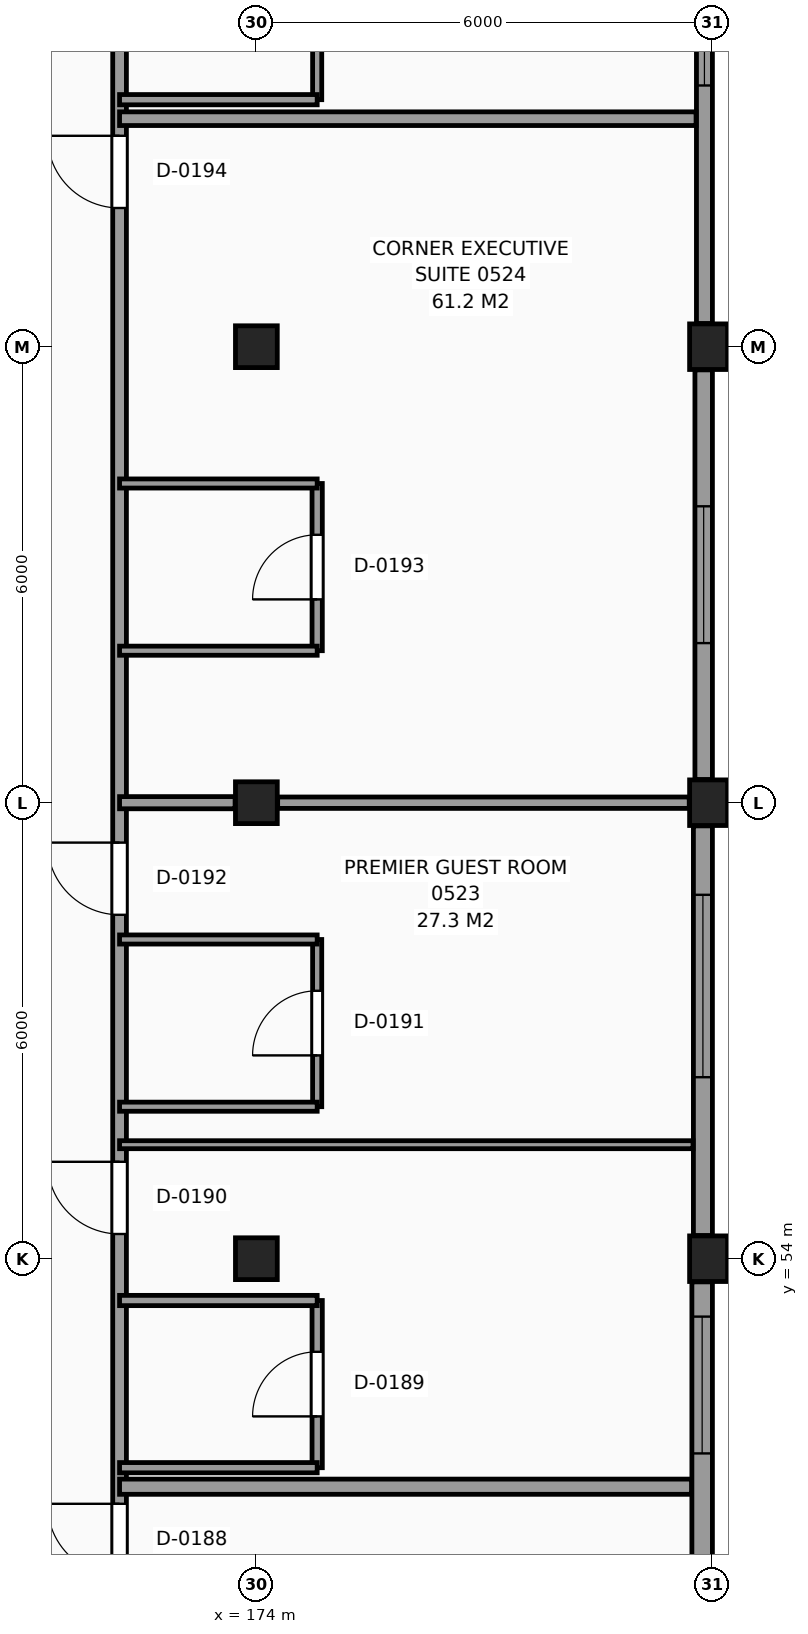
"""IFC4 building model, lengths in metres.
Left out: names, types, materials, properties, quantities, classifications, styles, units other than length and angle.
Written with IfcOpenShell. Run it as: python <this file> out.ifc"""

import sys

from ifc_helpers import new_model, si_unit, direction, frame, frame_2d, origin, origin_2d, place, context, subcontext, project, spatial, rectangle, extrude, element, fill, save


model = new_model("IFC4")
c1 = context("Model", 3, precision=1e-05, world=origin(), true_north=direction((0.0, 1.0)))
c2 = subcontext(c1, "Body", "Model", "MODEL_VIEW")
j1 = project(units=[si_unit("LENGTHUNIT", "METRE"), si_unit("PLANEANGLEUNIT", "RADIAN")], contexts=[c1])
p1 = place(None, origin())
s1 = spatial("IfcSite", under=j1, at=p1, CompositionType="ELEMENT")
p2 = place(p1, origin())
s2 = spatial("IfcBuilding", under=s1, at=p2, CompositionType="ELEMENT")
p3 = place(p2, frame((0.0, 0.0, 24.6)))
s3 = spatial("IfcBuildingStorey", under=s2, at=p3, CompositionType="ELEMENT", Elevation=24.6)
for number, where, z_axis, x_axis in (
    (1, (174.0, 54.0, 0.0), (0.0, 0.0, 1.0), (1.0, 0.0, 0.0)),
    (2, (174.0, 60.0, 0.0), (0.0, 0.0, 1.0), (1.0, 0.0, 0.0)),
    (3, (174.0, 66.0, 0.0), (0.0, 0.0, 1.0), (1.0, 0.0, 0.0)),
):
    element("IfcColumn", number, at=place(p3, frame(where, z_axis=z_axis, x_axis=x_axis)), inside=s3, PredefinedType="COLUMN", context=c2, shape_type="SweptSolid", body=[
        extrude(rectangle(XDim=0.55, YDim=0.55, at=origin_2d()), origin(), (0.0, 0.0, 1.0), 3.6),
    ])
for number, where, z_axis, x_axis in (
    (4, (180.0, 54.0, 0.0), (0.0, 0.0, 1.0), (1.0, 0.0, 0.0)),
    (5, (180.0, 60.0, 0.0), (0.0, 0.0, 1.0), (1.0, 0.0, 0.0)),
    (6, (180.0, 66.0, 0.0), (0.0, 0.0, 1.0), (1.0, 0.0, 0.0)),
):
    element("IfcColumn", number, at=place(p3, frame(where, z_axis=z_axis, x_axis=x_axis)), inside=s3, PredefinedType="COLUMN", context=c2, shape_type="SweptSolid", body=[
        extrude(rectangle(XDim=0.6, YDim=0.6, at=origin_2d()), origin(), (0.0, 0.0, 1.0), 3.6),
    ])
p4 = place(p3, frame((179.865, 48.305, 0.0), z_axis=(0.0, 0.0, 1.0), x_axis=(0.0, 1.0, 0.0)))
e7 = element("IfcWall", 7, at=p4, inside=s3, PredefinedType="SOLIDWALL", context=c2, shape_type="SweptSolid", body=[
    extrude(rectangle(XDim=5.39, YDim=0.27, at=frame_2d((2.695, 0.0))), origin(), (0.0, 0.0, 1.0), 2.73),
])
p5 = place(p4, frame((3.133, 0.0, 0.8)))
e8 = element("IfcOpeningElement", 8, at=p5, cuts=e7, PredefinedType="OPENING", context=c2, shape_type="SweptSolid", body=[
    extrude(rectangle(XDim=1.8, YDim=1.7, at=frame_2d((0.9, 0.85))), frame((0.0, 0.145, 0.0), z_axis=(0.0, -1.0, 0.0), x_axis=(1.0, 0.0, 0.0)), (0.0, 0.0, 1.0), 0.29),
])
p6 = place(p3, frame((179.875, 54.305, 0.0), z_axis=(0.0, 0.0, 1.0), x_axis=(0.0, 1.0, 0.0)))
e9 = element("IfcWall", 9, at=p6, inside=s3, PredefinedType="SOLIDWALL", context=c2, shape_type="SweptSolid", body=[
    extrude(rectangle(XDim=5.39, YDim=0.25, at=frame_2d((2.695, 0.0))), origin(), (0.0, 0.0, 1.0), 2.73),
])
p7 = place(p6, frame((2.083, 0.0, 0.8)))
e10 = element("IfcOpeningElement", 10, at=p7, cuts=e9, PredefinedType="OPENING", context=c2, shape_type="SweptSolid", body=[
    extrude(rectangle(XDim=2.4, YDim=1.75, at=frame_2d((1.2, 0.875))), frame((0.0, 0.135, 0.0), z_axis=(0.0, -1.0, 0.0), x_axis=(1.0, 0.0, 0.0)), (0.0, 0.0, 1.0), 0.27),
])
p8 = place(p3, frame((179.885, 60.305, 0.0), z_axis=(0.0, 0.0, 1.0), x_axis=(0.0, 1.0, 0.0)))
e11 = element("IfcWall", 11, at=p8, inside=s3, PredefinedType="SOLIDWALL", context=c2, shape_type="SweptSolid", body=[
    extrude(rectangle(XDim=5.39, YDim=0.23, at=frame_2d((2.695, 0.0))), origin(), (0.0, 0.0, 1.0), 2.73),
])
p9 = place(p8, frame((1.795, 0.0, 0.8)))
e12 = element("IfcOpeningElement", 12, at=p9, cuts=e11, PredefinedType="OPENING", context=c2, shape_type="SweptSolid", body=[
    extrude(rectangle(XDim=1.8, YDim=1.7, at=frame_2d((0.9, 0.85))), frame((0.0, 0.125, 0.0), z_axis=(0.0, -1.0, 0.0), x_axis=(1.0, 0.0, 0.0)), (0.0, 0.0, 1.0), 0.25),
])
p10 = place(p3, frame((179.895, 66.305, 0.0), z_axis=(0.0, 0.0, 1.0), x_axis=(0.0, 1.0, 0.0)))
e13 = element("IfcWall", 13, at=p10, inside=s3, PredefinedType="SOLIDWALL", context=c2, shape_type="SweptSolid", body=[
    extrude(rectangle(XDim=5.39, YDim=0.21, at=frame_2d((2.695, 0.0))), origin(), (0.0, 0.0, 1.0), 2.73),
])
p11 = place(p10, frame((3.132, 0.0, 0.8)))
e14 = element("IfcOpeningElement", 14, at=p11, cuts=e13, PredefinedType="OPENING", context=c2, shape_type="SweptSolid", body=[
    extrude(rectangle(XDim=1.8, YDim=1.7, at=frame_2d((0.9, 0.85))), frame((0.0, 0.115, 0.0), z_axis=(0.0, -1.0, 0.0), x_axis=(1.0, 0.0, 0.0)), (0.0, 0.0, 1.0), 0.23),
])
p12 = place(p3, frame((172.2, 42.215, 0.0), z_axis=(0.0, 0.0, 1.0), x_axis=(0.0, 1.0, 0.0)))
e15 = element("IfcWall", 15, at=p12, inside=s3, PredefinedType="PARTITIONING", context=c2, shape_type="SweptSolid", body=[
    extrude(rectangle(XDim=65.605, YDim=0.18, at=frame_2d((32.802, 0.0))), origin(), (0.0, 0.0, 1.0), 3.38),
])
p13 = place(p12, frame((7.61, 0.0, 0.0)))
e16 = element("IfcOpeningElement", 16, at=p13, cuts=e15, PredefinedType="OPENING", context=c2, shape_type="SweptSolid", body=[
    extrude(rectangle(XDim=0.95, YDim=2.1, at=frame_2d((0.475, 1.05))), frame((0.0, 0.1, 0.0), z_axis=(0.0, -1.0, 0.0), x_axis=(1.0, 0.0, 0.0)), (0.0, 0.0, 1.0), 0.2),
])
p14 = place(p12, frame((12.11, 0.0, 0.0)))
e17 = element("IfcOpeningElement", 17, at=p14, cuts=e15, PredefinedType="OPENING", context=c2, shape_type="SweptSolid", body=[
    extrude(rectangle(XDim=0.95, YDim=2.1, at=frame_2d((0.475, 1.05))), frame((0.0, 0.1, 0.0), z_axis=(0.0, -1.0, 0.0), x_axis=(1.0, 0.0, 0.0)), (0.0, 0.0, 1.0), 0.2),
])
p15 = place(p12, frame((16.31, 0.0, 0.0)))
e18 = element("IfcOpeningElement", 18, at=p15, cuts=e15, PredefinedType="OPENING", context=c2, shape_type="SweptSolid", body=[
    extrude(rectangle(XDim=0.95, YDim=2.1, at=frame_2d((0.475, 1.05))), frame((0.0, 0.1, 0.0), z_axis=(0.0, -1.0, 0.0), x_axis=(1.0, 0.0, 0.0)), (0.0, 0.0, 1.0), 0.2),
])
p16 = place(p12, frame((25.61, 0.0, 0.0)))
e19 = element("IfcOpeningElement", 19, at=p16, cuts=e15, PredefinedType="OPENING", context=c2, shape_type="SweptSolid", body=[
    extrude(rectangle(XDim=0.95, YDim=2.1, at=frame_2d((0.475, 1.05))), frame((0.0, 0.1, 0.0), z_axis=(0.0, -1.0, 0.0), x_axis=(1.0, 0.0, 0.0)), (0.0, 0.0, 1.0), 0.2),
])
p17 = place(p12, frame((30.11, 0.0, 0.0)))
e20 = element("IfcOpeningElement", 20, at=p17, cuts=e15, PredefinedType="OPENING", context=c2, shape_type="SweptSolid", body=[
    extrude(rectangle(XDim=0.95, YDim=2.1, at=frame_2d((0.475, 1.05))), frame((0.0, 0.1, 0.0), z_axis=(0.0, -1.0, 0.0), x_axis=(1.0, 0.0, 0.0)), (0.0, 0.0, 1.0), 0.2),
])
p18 = place(p12, frame((34.31, 0.0, 0.0)))
e21 = element("IfcOpeningElement", 21, at=p18, cuts=e15, PredefinedType="OPENING", context=c2, shape_type="SweptSolid", body=[
    extrude(rectangle(XDim=0.95, YDim=2.1, at=frame_2d((0.475, 1.05))), frame((0.0, 0.1, 0.0), z_axis=(0.0, -1.0, 0.0), x_axis=(1.0, 0.0, 0.0)), (0.0, 0.0, 1.0), 0.2),
])
p19 = place(p12, frame((36.51, 0.0, 0.0)))
e22 = element("IfcOpeningElement", 22, at=p19, cuts=e15, PredefinedType="OPENING", context=c2, shape_type="SweptSolid", body=[
    extrude(rectangle(XDim=0.95, YDim=2.1, at=frame_2d((0.475, 1.05))), frame((0.0, 0.1, 0.0), z_axis=(0.0, -1.0, 0.0), x_axis=(1.0, 0.0, 0.0)), (0.0, 0.0, 1.0), 0.2),
])
p20 = place(p12, frame((42.51, 0.0, 0.0)))
e23 = element("IfcOpeningElement", 23, at=p20, cuts=e15, PredefinedType="OPENING", context=c2, shape_type="SweptSolid", body=[
    extrude(rectangle(XDim=0.95, YDim=2.1, at=frame_2d((0.475, 1.05))), frame((0.0, 0.1, 0.0), z_axis=(0.0, -1.0, 0.0), x_axis=(1.0, 0.0, 0.0)), (0.0, 0.0, 1.0), 0.2),
])
p21 = place(p12, frame((52.31, 0.0, 0.0)))
e24 = element("IfcOpeningElement", 24, at=p21, cuts=e15, PredefinedType="OPENING", context=c2, shape_type="SweptSolid", body=[
    extrude(rectangle(XDim=0.95, YDim=2.1, at=frame_2d((0.475, 1.05))), frame((0.0, 0.1, 0.0), z_axis=(0.0, -1.0, 0.0), x_axis=(1.0, 0.0, 0.0)), (0.0, 0.0, 1.0), 0.2),
])
p22 = place(p12, frame((54.51, 0.0, 0.0)))
e25 = element("IfcOpeningElement", 25, at=p22, cuts=e15, PredefinedType="OPENING", context=c2, shape_type="SweptSolid", body=[
    extrude(rectangle(XDim=0.95, YDim=2.1, at=frame_2d((0.475, 1.05))), frame((0.0, 0.1, 0.0), z_axis=(0.0, -1.0, 0.0), x_axis=(1.0, 0.0, 0.0)), (0.0, 0.0, 1.0), 0.2),
])
p23 = place(p12, frame((60.51, 0.0, 0.0)))
e26 = element("IfcOpeningElement", 26, at=p23, cuts=e15, PredefinedType="OPENING", context=c2, shape_type="SweptSolid", body=[
    extrude(rectangle(XDim=0.95, YDim=2.1, at=frame_2d((0.475, 1.05))), frame((0.0, 0.1, 0.0), z_axis=(0.0, -1.0, 0.0), x_axis=(1.0, 0.0, 0.0)), (0.0, 0.0, 1.0), 0.2),
])
p24 = place(p3, frame((174.8, 51.25, 0.0), z_axis=(0.0, 0.0, 1.0), x_axis=(0.0, 1.0, 0.0)))
e27 = element("IfcWall", 27, at=p24, inside=s3, PredefinedType="PARTITIONING", context=c2, shape_type="SweptSolid", body=[
    extrude(rectangle(XDim=2.2, YDim=0.135, at=frame_2d((1.1, 0.0))), origin(), (0.0, 0.0, 1.0), 3.38),
])
p25 = place(p24, frame((0.675, 0.0, 0.0)))
e28 = element("IfcOpeningElement", 28, at=p25, cuts=e27, PredefinedType="OPENING", context=c2, shape_type="SweptSolid", body=[
    extrude(rectangle(XDim=0.85, YDim=2.1, at=frame_2d((0.425, 1.05))), frame((0.0, 0.078, 0.0), z_axis=(0.0, -1.0, 0.0), x_axis=(1.0, 0.0, 0.0)), (0.0, 0.0, 1.0), 0.155),
])
p26 = place(p3, frame((174.8, 56.0, 0.0), z_axis=(0.0, 0.0, 1.0), x_axis=(0.0, 1.0, 0.0)))
e29 = element("IfcWall", 29, at=p26, inside=s3, PredefinedType="PARTITIONING", context=c2, shape_type="SweptSolid", body=[
    extrude(rectangle(XDim=2.2, YDim=0.12, at=frame_2d((1.1, 0.0))), origin(), (0.0, 0.0, 1.0), 3.38),
])
p27 = place(p26, frame((0.675, 0.0, 0.0)))
e30 = element("IfcOpeningElement", 30, at=p27, cuts=e29, PredefinedType="OPENING", context=c2, shape_type="SweptSolid", body=[
    extrude(rectangle(XDim=0.85, YDim=2.1, at=frame_2d((0.425, 1.05))), frame((0.0, 0.07, 0.0), z_axis=(0.0, -1.0, 0.0), x_axis=(1.0, 0.0, 0.0)), (0.0, 0.0, 1.0), 0.14),
])
p28 = place(p3, frame((174.8, 62.0, 0.0), z_axis=(0.0, 0.0, 1.0), x_axis=(0.0, 1.0, 0.0)))
e31 = element("IfcWall", 31, at=p28, inside=s3, PredefinedType="PARTITIONING", context=c2, shape_type="SweptSolid", body=[
    extrude(rectangle(XDim=2.2, YDim=0.135, at=frame_2d((1.1, 0.0))), origin(), (0.0, 0.0, 1.0), 3.38),
])
p29 = place(p28, frame((0.675, 0.0, 0.0)))
e32 = element("IfcOpeningElement", 32, at=p29, cuts=e31, PredefinedType="OPENING", context=c2, shape_type="SweptSolid", body=[
    extrude(rectangle(XDim=0.85, YDim=2.1, at=frame_2d((0.425, 1.05))), frame((0.0, 0.078, 0.0), z_axis=(0.0, -1.0, 0.0), x_axis=(1.0, 0.0, 0.0)), (0.0, 0.0, 1.0), 0.155),
])
p30 = place(p3, frame((174.8, 69.25, 0.0), z_axis=(0.0, 0.0, 1.0), x_axis=(0.0, 1.0, 0.0)))
e33 = element("IfcWall", 33, at=p30, inside=s3, PredefinedType="PARTITIONING", context=c2, shape_type="SweptSolid", body=[
    extrude(rectangle(XDim=2.2, YDim=0.12, at=frame_2d((1.1, 0.0))), origin(), (0.0, 0.0, 1.0), 3.38),
])
p31 = place(p30, frame((0.675, 0.0, 0.0)))
e34 = element("IfcOpeningElement", 34, at=p31, cuts=e33, PredefinedType="OPENING", context=c2, shape_type="SweptSolid", body=[
    extrude(rectangle(XDim=0.85, YDim=2.1, at=frame_2d((0.425, 1.05))), frame((0.0, 0.07, 0.0), z_axis=(0.0, -1.0, 0.0), x_axis=(1.0, 0.0, 0.0)), (0.0, 0.0, 1.0), 0.14),
])
p32 = place(p3, frame((172.2, 51.0, 0.0), z_axis=(0.0, 0.0, 1.0), x_axis=(1.0, 0.0, 0.0)))
e35 = element("IfcWall", 35, at=p32, inside=s3, PredefinedType="PARTITIONING", context=c2, shape_type="SweptSolid", body=[
    extrude(rectangle(XDim=7.525, YDim=0.2, at=frame_2d((3.763, 0.0))), origin(), (0.0, 0.0, 1.0), 3.38),
])
for number, where, z_axis, x_axis in (
    (36, (172.2, 51.25, 0.0), (0.0, 0.0, 1.0), (1.0, 0.0, 0.0)),
    (37, (172.2, 53.45, 0.0), (0.0, 0.0, 1.0), (1.0, 0.0, 0.0)),
):
    element("IfcWall", number, at=place(p3, frame(where, z_axis=z_axis, x_axis=x_axis)), inside=s3, PredefinedType="PARTITIONING", context=c2, shape_type="SweptSolid", body=[
        extrude(rectangle(XDim=2.6, YDim=0.135, at=frame_2d((1.3, 0.0))), origin(), (0.0, 0.0, 1.0), 3.38),
    ])
p33 = place(p3, frame((172.2, 55.5, 0.0), z_axis=(0.0, 0.0, 1.0), x_axis=(1.0, 0.0, 0.0)))
e38 = element("IfcWall", 38, at=p33, inside=s3, PredefinedType="PARTITIONING", context=c2, shape_type="SweptSolid", body=[
    extrude(rectangle(XDim=7.545, YDim=0.105, at=frame_2d((3.772, 0.0))), origin(), (0.0, 0.0, 1.0), 3.38),
])
for number, where, z_axis, x_axis in (
    (39, (172.2, 56.0, 0.0), (0.0, 0.0, 1.0), (1.0, 0.0, 0.0)),
    (40, (172.2, 58.2, 0.0), (0.0, 0.0, 1.0), (1.0, 0.0, 0.0)),
):
    element("IfcWall", number, at=place(p3, frame(where, z_axis=z_axis, x_axis=x_axis)), inside=s3, PredefinedType="PARTITIONING", context=c2, shape_type="SweptSolid", body=[
        extrude(rectangle(XDim=2.6, YDim=0.12, at=frame_2d((1.3, 0.0))), origin(), (0.0, 0.0, 1.0), 3.38),
    ])
p34 = place(p3, frame((172.2, 60.0, 0.0), z_axis=(0.0, 0.0, 1.0), x_axis=(1.0, 0.0, 0.0)))
e41 = element("IfcWall", 41, at=p34, inside=s3, PredefinedType="PARTITIONING", context=c2, shape_type="SweptSolid", body=[
    extrude(rectangle(XDim=1.52, YDim=0.16, at=frame_2d((0.76, 0.0))), origin(), (0.0, 0.0, 1.0), 2.58),
])
p35 = place(p3, frame((174.28, 60.0, 0.0), z_axis=(0.0, 0.0, 1.0), x_axis=(1.0, 0.0, 0.0)))
e42 = element("IfcWall", 42, at=p35, inside=s3, PredefinedType="PARTITIONING", context=c2, shape_type="SweptSolid", body=[
    extrude(rectangle(XDim=5.415, YDim=0.15, at=frame_2d((2.708, 0.0))), origin(), (0.0, 0.0, 1.0), 2.58),
])
for number, where, z_axis, x_axis in (
    (43, (172.2, 62.0, 0.0), (0.0, 0.0, 1.0), (1.0, 0.0, 0.0)),
    (44, (172.2, 64.2, 0.0), (0.0, 0.0, 1.0), (1.0, 0.0, 0.0)),
):
    element("IfcWall", number, at=place(p3, frame(where, z_axis=z_axis, x_axis=x_axis)), inside=s3, PredefinedType="PARTITIONING", context=c2, shape_type="SweptSolid", body=[
        extrude(rectangle(XDim=2.6, YDim=0.12, at=frame_2d((1.3, 0.0))), origin(), (0.0, 0.0, 1.0), 3.38),
    ])
p36 = place(p3, frame((172.2, 69.0, 0.0), z_axis=(0.0, 0.0, 1.0), x_axis=(1.0, 0.0, 0.0)))
e45 = element("IfcWall", 45, at=p36, inside=s3, PredefinedType="PARTITIONING", context=c2, shape_type="SweptSolid", body=[
    extrude(rectangle(XDim=7.585, YDim=0.18, at=frame_2d((3.792, 0.0))), origin(), (0.0, 0.0, 1.0), 3.38),
])
p37 = place(p3, frame((172.2, 69.25, 0.0), z_axis=(0.0, 0.0, 1.0), x_axis=(1.0, 0.0, 0.0)))
e46 = element("IfcWall", 46, at=p37, inside=s3, PredefinedType="PARTITIONING", context=c2, shape_type="SweptSolid", body=[
    extrude(rectangle(XDim=2.6, YDim=0.135, at=frame_2d((1.3, 0.0))), origin(), (0.0, 0.0, 1.0), 3.38),
])
p38 = place(p5, origin())
e47 = element("IfcWindow", 47, at=p38, inside=s3, PartitioningType="SINGLE_PANEL", PredefinedType="WINDOW", context=c2, shape_type="SweptSolid", body=[
    extrude(rectangle(XDim=1.8, YDim=1.7, at=frame_2d((0.9, 0.85))), frame((0.0, 0.03, 0.0), z_axis=(0.0, -1.0, 0.0), x_axis=(1.0, 0.0, 0.0)), (0.0, 0.0, 1.0), 0.06),
])
fill(e8, e47)
p39 = place(p7, origin())
e48 = element("IfcWindow", 48, at=p39, inside=s3, PartitioningType="SINGLE_PANEL", PredefinedType="WINDOW", context=c2, shape_type="SweptSolid", body=[
    extrude(rectangle(XDim=2.4, YDim=1.75, at=frame_2d((1.2, 0.875))), frame((0.0, 0.03, 0.0), z_axis=(0.0, -1.0, 0.0), x_axis=(1.0, 0.0, 0.0)), (0.0, 0.0, 1.0), 0.06),
])
fill(e10, e48)
p40 = place(p9, origin())
e49 = element("IfcWindow", 49, at=p40, inside=s3, PartitioningType="SINGLE_PANEL", PredefinedType="WINDOW", context=c2, shape_type="SweptSolid", body=[
    extrude(rectangle(XDim=1.8, YDim=1.7, at=frame_2d((0.9, 0.85))), frame((0.0, 0.03, 0.0), z_axis=(0.0, -1.0, 0.0), x_axis=(1.0, 0.0, 0.0)), (0.0, 0.0, 1.0), 0.06),
])
fill(e12, e49)
p41 = place(p11, origin())
e50 = element("IfcWindow", 50, at=p41, inside=s3, PartitioningType="SINGLE_PANEL", PredefinedType="WINDOW", context=c2, shape_type="SweptSolid", body=[
    extrude(rectangle(XDim=1.8, YDim=1.7, at=frame_2d((0.9, 0.85))), frame((0.0, 0.03, 0.0), z_axis=(0.0, -1.0, 0.0), x_axis=(1.0, 0.0, 0.0)), (0.0, 0.0, 1.0), 0.06),
])
fill(e14, e50)
p42 = place(p13, origin())
e51 = element("IfcDoor", 51, at=p42, inside=s3, OperationType="SINGLE_SWING_RIGHT", PredefinedType="DOOR", context=c2, shape_type="SweptSolid", body=[
    extrude(rectangle(XDim=0.95, YDim=2.1, at=frame_2d((0.475, 1.05))), frame((0.0, 0.025, 0.0), z_axis=(0.0, -1.0, 0.0), x_axis=(1.0, 0.0, 0.0)), (0.0, 0.0, 1.0), 0.05),
])
fill(e16, e51)
p43 = place(p25, origin())
e52 = element("IfcDoor", 52, at=p43, inside=s3, OperationType="SINGLE_SWING_LEFT", PredefinedType="DOOR", context=c2, shape_type="SweptSolid", body=[
    extrude(rectangle(XDim=0.85, YDim=2.1, at=frame_2d((0.425, 1.05))), frame((0.0, 0.025, 0.0), z_axis=(0.0, -1.0, 0.0), x_axis=(1.0, 0.0, 0.0)), (0.0, 0.0, 1.0), 0.05),
])
fill(e28, e52)
p44 = place(p14, origin())
e53 = element("IfcDoor", 53, at=p44, inside=s3, OperationType="SINGLE_SWING_RIGHT", PredefinedType="DOOR", context=c2, shape_type="SweptSolid", body=[
    extrude(rectangle(XDim=0.95, YDim=2.1, at=frame_2d((0.475, 1.05))), frame((0.0, 0.025, 0.0), z_axis=(0.0, -1.0, 0.0), x_axis=(1.0, 0.0, 0.0)), (0.0, 0.0, 1.0), 0.05),
])
fill(e17, e53)
p45 = place(p27, origin())
e54 = element("IfcDoor", 54, at=p45, inside=s3, OperationType="SINGLE_SWING_LEFT", PredefinedType="DOOR", context=c2, shape_type="SweptSolid", body=[
    extrude(rectangle(XDim=0.85, YDim=2.1, at=frame_2d((0.425, 1.05))), frame((0.0, 0.025, 0.0), z_axis=(0.0, -1.0, 0.0), x_axis=(1.0, 0.0, 0.0)), (0.0, 0.0, 1.0), 0.05),
])
fill(e30, e54)
p46 = place(p15, origin())
e55 = element("IfcDoor", 55, at=p46, inside=s3, OperationType="SINGLE_SWING_RIGHT", PredefinedType="DOOR", context=c2, shape_type="SweptSolid", body=[
    extrude(rectangle(XDim=0.95, YDim=2.1, at=frame_2d((0.475, 1.05))), frame((0.0, 0.025, 0.0), z_axis=(0.0, -1.0, 0.0), x_axis=(1.0, 0.0, 0.0)), (0.0, 0.0, 1.0), 0.05),
])
fill(e18, e55)
p47 = place(p29, origin())
e56 = element("IfcDoor", 56, at=p47, inside=s3, OperationType="SINGLE_SWING_LEFT", PredefinedType="DOOR", context=c2, shape_type="SweptSolid", body=[
    extrude(rectangle(XDim=0.85, YDim=2.1, at=frame_2d((0.425, 1.05))), frame((0.0, 0.025, 0.0), z_axis=(0.0, -1.0, 0.0), x_axis=(1.0, 0.0, 0.0)), (0.0, 0.0, 1.0), 0.05),
])
fill(e32, e56)
p48 = place(p16, origin())
e57 = element("IfcDoor", 57, at=p48, inside=s3, OperationType="SINGLE_SWING_RIGHT", PredefinedType="DOOR", context=c2, shape_type="SweptSolid", body=[
    extrude(rectangle(XDim=0.95, YDim=2.1, at=frame_2d((0.475, 1.05))), frame((0.0, 0.025, 0.0), z_axis=(0.0, -1.0, 0.0), x_axis=(1.0, 0.0, 0.0)), (0.0, 0.0, 1.0), 0.05),
])
fill(e19, e57)
save(model, sys.argv[1])
